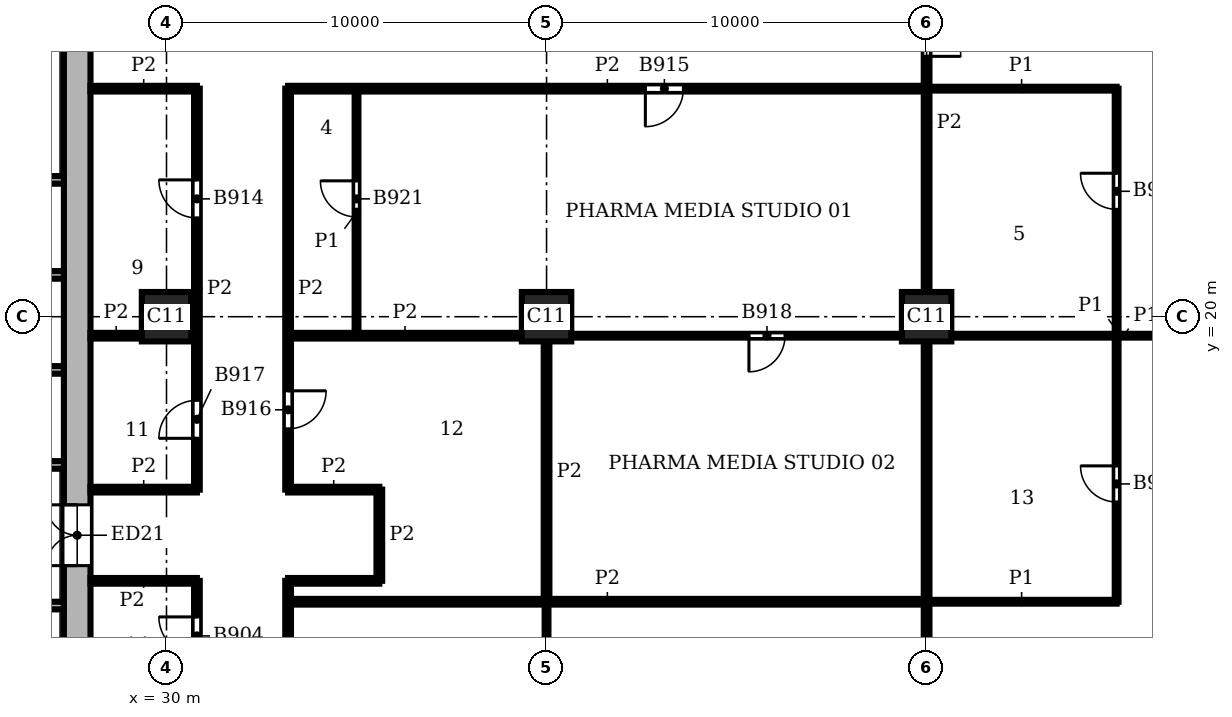
"""IFC4 building model, lengths in metres.
Left out: names, types, materials, properties, quantities, classifications, styles, units other than length and angle.
Written with IfcOpenShell. Run it as: python <this file> out.ifc"""

import sys

from ifc_helpers import new_model, si_unit, direction, frame, frame_2d, origin, origin_2d, place, context, subcontext, project, spatial, rectangle, extrude, element, fill, save


model = new_model("IFC4")
c1 = context("Model", 3, precision=1e-05, world=origin(), true_north=direction((0.0, 1.0)))
c2 = subcontext(c1, "Body", "Model", "MODEL_VIEW")
j1 = project(units=[si_unit("LENGTHUNIT", "METRE"), si_unit("PLANEANGLEUNIT", "RADIAN")], contexts=[c1])
p1 = place(None, origin())
s1 = spatial("IfcSite", under=j1, at=p1, CompositionType="ELEMENT")
p2 = place(p1, origin())
s2 = spatial("IfcBuilding", under=s1, at=p2, CompositionType="ELEMENT")
p3 = place(p2, frame((0.0, 0.0, 225.3)))
s3 = spatial("IfcBuildingStorey", under=s2, at=p3, CompositionType="ELEMENT", Elevation=225.3)
for number, where, z_axis, x_axis in (
    (1, (30.0, 20.0, 0.0), (0.0, 0.0, 1.0), (1.0, 0.0, 0.0)),
    (2, (40.0, 20.0, 0.0), (0.0, 0.0, 1.0), (1.0, 0.0, 0.0)),
    (3, (50.0, 20.0, 0.0), (0.0, 0.0, 1.0), (1.0, 0.0, 0.0)),
):
    element("IfcColumn", number, at=place(p3, frame(where, z_axis=z_axis, x_axis=x_axis)), inside=s3, PredefinedType="COLUMN", context=c2, shape_type="SweptSolid", body=[
        extrude(rectangle(XDim=1.3, YDim=1.3, at=origin_2d()), origin(), (0.0, 0.0, 1.0), 3.9),
    ])
p4 = place(p3, frame((27.65, 8.7, 0.0), z_axis=(0.0, 0.0, 1.0), x_axis=(0.0, 1.0, 0.0)))
e4 = element("IfcWall", 4, at=p4, inside=s3, PredefinedType="SHEAR", context=c2, shape_type="SweptSolid", body=[
    extrude(rectangle(XDim=18.6, YDim=0.7, at=frame_2d((9.3, 0.0))), origin(), (0.0, 0.0, 1.0), 3.9),
])
p5 = place(p4, frame((4.75, 0.0, 0.0)))
e5 = element("IfcOpeningElement", 5, at=p5, cuts=e4, PredefinedType="OPENING", context=c2, shape_type="SweptSolid", body=[
    extrude(rectangle(XDim=1.6, YDim=2.1, at=frame_2d((0.8, 1.05))), frame((0.0, 0.36, 0.0), z_axis=(0.0, -1.0, 0.0), x_axis=(1.0, 0.0, 0.0)), (0.0, 0.0, 1.0), 0.72),
])
p6 = place(p3, frame((13.8, 12.4, 0.0), z_axis=(0.0, 0.0, 1.0), x_axis=(1.0, 0.0, 0.0)))
e6 = element("IfcWall", 6, at=p6, inside=s3, PredefinedType="SHEAR", context=c2, shape_type="SweptSolid", body=[
    extrude(rectangle(XDim=13.5, YDim=0.2, at=frame_2d((6.75, 0.0))), origin(), (0.0, 0.0, 1.0), 3.58),
])
p7 = place(p6, frame((2.4, 0.0, 0.0)))
e7 = element("IfcOpeningElement", 7, at=p7, cuts=e6, PredefinedType="OPENING", context=c2, shape_type="SweptSolid", body=[
    extrude(rectangle(XDim=1.1, YDim=2.1, at=frame_2d((0.55, 1.05))), frame((0.0, 0.11, 0.0), z_axis=(0.0, -1.0, 0.0), x_axis=(1.0, 0.0, 0.0)), (0.0, 0.0, 1.0), 0.22),
])
p8 = place(p6, frame((4.9, 0.0, 0.0)))
e8 = element("IfcOpeningElement", 8, at=p8, cuts=e6, PredefinedType="OPENING", context=c2, shape_type="SweptSolid", body=[
    extrude(rectangle(XDim=1.1, YDim=2.1, at=frame_2d((0.55, 1.05))), frame((0.0, 0.11, 0.0), z_axis=(0.0, -1.0, 0.0), x_axis=(1.0, 0.0, 0.0)), (0.0, 0.0, 1.0), 0.22),
])
p9 = place(p6, frame((0.2, 0.0, 0.0)))
e9 = element("IfcOpeningElement", 9, at=p9, cuts=e6, PredefinedType="OPENING", context=c2, shape_type="SweptSolid", body=[
    extrude(rectangle(XDim=1.0, YDim=2.1, at=frame_2d((0.5, 1.05))), frame((0.0, 0.11, 0.0), z_axis=(0.0, -1.0, 0.0), x_axis=(1.0, 0.0, 0.0)), (0.0, 0.0, 1.0), 0.22),
])
for number, where, z_axis, x_axis in (
    (10, (24.3, 16.1, 0.0), (0.0, 0.0, 1.0), (1.0, 0.0, 0.0)),
    (11, (24.3, 18.6, 0.0), (0.0, 0.0, 1.0), (1.0, 0.0, 0.0)),
    (12, (24.3, 21.1, 0.0), (0.0, 0.0, 1.0), (1.0, 0.0, 0.0)),
):
    element("IfcWall", number, at=place(p3, frame(where, z_axis=z_axis, x_axis=x_axis)), inside=s3, PredefinedType="SHEAR", context=c2, shape_type="SweptSolid", body=[
        extrude(rectangle(XDim=3.0, YDim=0.2, at=frame_2d((1.5, 0.0))), origin(), (0.0, 0.0, 1.0), 3.58),
    ])
p10 = place(p3, frame((13.8, 23.6, 0.0), z_axis=(0.0, 0.0, 1.0), x_axis=(1.0, 0.0, 0.0)))
e13 = element("IfcWall", 13, at=p10, inside=s3, PredefinedType="SHEAR", context=c2, shape_type="SweptSolid", body=[
    extrude(rectangle(XDim=13.5, YDim=0.2, at=frame_2d((6.75, 0.0))), origin(), (0.0, 0.0, 1.0), 3.58),
])
p11 = place(p10, frame((2.4, 0.0, 0.0)))
e14 = element("IfcOpeningElement", 14, at=p11, cuts=e13, PredefinedType="OPENING", context=c2, shape_type="SweptSolid", body=[
    extrude(rectangle(XDim=1.1, YDim=2.1, at=frame_2d((0.55, 1.05))), frame((0.0, 0.11, 0.0), z_axis=(0.0, -1.0, 0.0), x_axis=(1.0, 0.0, 0.0)), (0.0, 0.0, 1.0), 0.22),
])
p12 = place(p10, frame((4.9, 0.0, 0.0)))
e15 = element("IfcOpeningElement", 15, at=p12, cuts=e13, PredefinedType="OPENING", context=c2, shape_type="SweptSolid", body=[
    extrude(rectangle(XDim=1.1, YDim=2.1, at=frame_2d((0.55, 1.05))), frame((0.0, 0.11, 0.0), z_axis=(0.0, -1.0, 0.0), x_axis=(1.0, 0.0, 0.0)), (0.0, 0.0, 1.0), 0.22),
])
p13 = place(p10, frame((0.2, 0.0, 0.0)))
e16 = element("IfcOpeningElement", 16, at=p13, cuts=e13, PredefinedType="OPENING", context=c2, shape_type="SweptSolid", body=[
    extrude(rectangle(XDim=1.0, YDim=2.1, at=frame_2d((0.5, 1.05))), frame((0.0, 0.11, 0.0), z_axis=(0.0, -1.0, 0.0), x_axis=(1.0, 0.0, 0.0)), (0.0, 0.0, 1.0), 0.22),
])
p14 = place(p3, frame((35.0, 19.5, 0.0), z_axis=(0.0, 0.0, 1.0), x_axis=(0.0, 1.0, 0.0)))
e17 = element("IfcWall", 17, at=p14, inside=s3, PredefinedType="PARTITIONING", context=c2, shape_type="SweptSolid", body=[
    extrude(rectangle(XDim=6.5, YDim=0.1, at=frame_2d((3.25, 0.0))), origin(), (0.0, 0.0, 1.0), 3.58),
])
p15 = place(p14, frame((3.125, 0.0, 0.0)))
e18 = element("IfcOpeningElement", 18, at=p15, cuts=e17, PredefinedType="OPENING", context=c2, shape_type="SweptSolid", body=[
    extrude(rectangle(XDim=0.95, YDim=2.1, at=frame_2d((0.475, 1.05))), frame((0.0, 0.06, 0.0), z_axis=(0.0, -1.0, 0.0), x_axis=(1.0, 0.0, 0.0)), (0.0, 0.0, 1.0), 0.12),
])
p16 = place(p3, frame((40.0, 10.65, 0.0), z_axis=(0.0, 0.0, 1.0), x_axis=(0.0, 1.0, 0.0)))
e19 = element("IfcWall", 19, at=p16, inside=s3, PredefinedType="PARTITIONING", context=c2, shape_type="SweptSolid", body=[
    extrude(rectangle(XDim=1.85, YDim=0.1, at=frame_2d((0.925, 0.0))), origin(), (0.0, 0.0, 1.0), 3.58),
])
p17 = place(p3, frame((55.0, 12.5, 0.0), z_axis=(0.0, 0.0, 1.0), x_axis=(0.0, 1.0, 0.0)))
e20 = element("IfcWall", 20, at=p17, inside=s3, PredefinedType="PARTITIONING", context=c2, shape_type="SweptSolid", body=[
    extrude(rectangle(XDim=13.5, YDim=0.1, at=frame_2d((6.75, 0.0))), origin(), (0.0, 0.0, 1.0), 3.58),
])
p18 = place(p17, frame((10.325, 0.0, 0.0)))
e21 = element("IfcOpeningElement", 21, at=p18, cuts=e20, PredefinedType="OPENING", context=c2, shape_type="SweptSolid", body=[
    extrude(rectangle(XDim=0.95, YDim=2.1, at=frame_2d((0.475, 1.05))), frame((0.0, 0.06, 0.0), z_axis=(0.0, -1.0, 0.0), x_axis=(1.0, 0.0, 0.0)), (0.0, 0.0, 1.0), 0.12),
])
p19 = place(p17, frame((2.625, 0.0, 0.0)))
e22 = element("IfcOpeningElement", 22, at=p19, cuts=e20, PredefinedType="OPENING", context=c2, shape_type="SweptSolid", body=[
    extrude(rectangle(XDim=0.95, YDim=2.1, at=frame_2d((0.475, 1.05))), frame((0.0, 0.06, 0.0), z_axis=(0.0, -1.0, 0.0), x_axis=(1.0, 0.0, 0.0)), (0.0, 0.0, 1.0), 0.12),
])
p20 = place(p3, frame((50.0, 12.5, 0.0), z_axis=(0.0, 0.0, 1.0), x_axis=(1.0, 0.0, 0.0)))
e23 = element("IfcWall", 23, at=p20, inside=s3, PredefinedType="PARTITIONING", context=c2, shape_type="SweptSolid", body=[
    extrude(rectangle(XDim=5.0, YDim=0.1, at=frame_2d((2.5, 0.0))), origin(), (0.0, 0.0, 1.0), 3.58),
])
p21 = place(p3, frame((40.65, 19.5, 0.0), z_axis=(0.0, 0.0, 1.0), x_axis=(1.0, 0.0, 0.0)))
e24 = element("IfcWall", 24, at=p21, inside=s3, PredefinedType="PARTITIONING", context=c2, shape_type="SweptSolid", body=[
    extrude(rectangle(XDim=8.7, YDim=0.1, at=frame_2d((4.35, 0.0))), origin(), (0.0, 0.0, 1.0), 3.58),
])
p22 = place(p21, frame((4.675, 0.0, 0.0)))
e25 = element("IfcOpeningElement", 25, at=p22, cuts=e24, PredefinedType="OPENING", context=c2, shape_type="SweptSolid", body=[
    extrude(rectangle(XDim=0.95, YDim=2.1, at=frame_2d((0.475, 1.05))), frame((0.0, 0.06, 0.0), z_axis=(0.0, -1.0, 0.0), x_axis=(1.0, 0.0, 0.0)), (0.0, 0.0, 1.0), 0.12),
])
p23 = place(p3, frame((50.65, 19.5, 0.0), z_axis=(0.0, 0.0, 1.0), x_axis=(1.0, 0.0, 0.0)))
e26 = element("IfcWall", 26, at=p23, inside=s3, PredefinedType="PARTITIONING", context=c2, shape_type="SweptSolid", body=[
    extrude(rectangle(XDim=8.9, YDim=0.1, at=frame_2d((4.45, 0.0))), origin(), (0.0, 0.0, 1.0), 3.58),
])
p24 = place(p23, frame((6.45, 0.0, 0.0)))
e27 = element("IfcOpeningElement", 27, at=p24, cuts=e26, PredefinedType="OPENING", context=c2, shape_type="SweptSolid", body=[
    extrude(rectangle(XDim=0.9, YDim=2.1, at=frame_2d((0.45, 1.05))), frame((0.0, 0.06, 0.0), z_axis=(0.0, -1.0, 0.0), x_axis=(1.0, 0.0, 0.0)), (0.0, 0.0, 1.0), 0.12),
])
p25 = place(p3, frame((50.0, 26.0, 0.0), z_axis=(0.0, 0.0, 1.0), x_axis=(1.0, 0.0, 0.0)))
e28 = element("IfcWall", 28, at=p25, inside=s3, PredefinedType="PARTITIONING", context=c2, shape_type="SweptSolid", body=[
    extrude(rectangle(XDim=5.0, YDim=0.1, at=frame_2d((2.5, 0.0))), origin(), (0.0, 0.0, 1.0), 3.58),
])
p26 = place(p3, frame((30.8, 8.001, 0.0), z_axis=(0.0, 0.0, 1.0), x_axis=(0.0, 1.0, 0.0)))
e29 = element("IfcWall", 29, at=p26, inside=s3, PredefinedType="PARTITIONING", context=c2, shape_type="SweptSolid", body=[
    extrude(rectangle(XDim=5.048, YDim=0.15, at=frame_2d((2.524, 0.0))), origin(), (0.0, 0.0, 1.0), 3.58),
])
p27 = place(p26, frame((3.1, 0.0, 0.0)))
e30 = element("IfcOpeningElement", 30, at=p27, cuts=e29, PredefinedType="OPENING", context=c2, shape_type="SweptSolid", body=[
    extrude(rectangle(XDim=1.0, YDim=2.1, at=frame_2d((0.5, 1.05))), frame((0.0, 0.085, 0.0), z_axis=(0.0, -1.0, 0.0), x_axis=(1.0, 0.0, 0.0)), (0.0, 0.0, 1.0), 0.17),
])
p28 = place(p3, frame((30.8, 15.45, 0.0), z_axis=(0.0, 0.0, 1.0), x_axis=(0.0, 1.0, 0.0)))
e31 = element("IfcWall", 31, at=p28, inside=s3, PredefinedType="PARTITIONING", context=c2, shape_type="SweptSolid", body=[
    extrude(rectangle(XDim=10.55, YDim=0.15, at=frame_2d((5.275, 0.0))), origin(), (0.0, 0.0, 1.0), 3.58),
])
p29 = place(p28, frame((7.15, 0.0, 0.0)))
e32 = element("IfcOpeningElement", 32, at=p29, cuts=e31, PredefinedType="OPENING", context=c2, shape_type="SweptSolid", body=[
    extrude(rectangle(XDim=1.0, YDim=2.1, at=frame_2d((0.5, 1.05))), frame((0.0, 0.085, 0.0), z_axis=(0.0, -1.0, 0.0), x_axis=(1.0, 0.0, 0.0)), (0.0, 0.0, 1.0), 0.17),
])
p30 = place(p28, frame((1.35, 0.0, 0.0)))
e33 = element("IfcOpeningElement", 33, at=p30, cuts=e31, PredefinedType="OPENING", context=c2, shape_type="SweptSolid", body=[
    extrude(rectangle(XDim=1.0, YDim=2.1, at=frame_2d((0.5, 1.05))), frame((0.0, 0.085, 0.0), z_axis=(0.0, -1.0, 0.0), x_axis=(1.0, 0.0, 0.0)), (0.0, 0.0, 1.0), 0.17),
])
p31 = place(p3, frame((33.2, 8.0, 0.0), z_axis=(0.0, 0.0, 1.0), x_axis=(0.0, 1.0, 0.0)))
e34 = element("IfcWall", 34, at=p31, inside=s3, PredefinedType="PARTITIONING", context=c2, shape_type="SweptSolid", body=[
    extrude(rectangle(XDim=5.05, YDim=0.15, at=frame_2d((2.525, 0.0))), origin(), (0.0, 0.0, 1.0), 3.58),
])
p32 = place(p3, frame((33.2, 15.45, 0.0), z_axis=(0.0, 0.0, 1.0), x_axis=(0.0, 1.0, 0.0)))
e35 = element("IfcWall", 35, at=p32, inside=s3, PredefinedType="PARTITIONING", context=c2, shape_type="SweptSolid", body=[
    extrude(rectangle(XDim=10.55, YDim=0.15, at=frame_2d((5.275, 0.0))), origin(), (0.0, 0.0, 1.0), 3.58),
])
p33 = place(p32, frame((1.6, 0.0, 0.0)))
e36 = element("IfcOpeningElement", 36, at=p33, cuts=e35, PredefinedType="OPENING", context=c2, shape_type="SweptSolid", body=[
    extrude(rectangle(XDim=1.0, YDim=2.1, at=frame_2d((0.5, 1.05))), frame((0.0, 0.085, 0.0), z_axis=(0.0, -1.0, 0.0), x_axis=(1.0, 0.0, 0.0)), (0.0, 0.0, 1.0), 0.17),
])
p34 = place(p3, frame((35.6, 13.05, 0.0), z_axis=(0.0, 0.0, 1.0), x_axis=(0.0, 1.0, 0.0)))
e37 = element("IfcWall", 37, at=p34, inside=s3, PredefinedType="PARTITIONING", context=c2, shape_type="SweptSolid", body=[
    extrude(rectangle(XDim=2.4, YDim=0.15, at=frame_2d((1.2, 0.0))), origin(), (0.0, 0.0, 1.0), 3.58),
])
p35 = place(p3, frame((40.0, 12.5, 0.0), z_axis=(0.0, 0.0, 1.0), x_axis=(0.0, 1.0, 0.0)))
e38 = element("IfcWall", 38, at=p35, inside=s3, PredefinedType="PARTITIONING", context=c2, shape_type="SweptSolid", body=[
    extrude(rectangle(XDim=6.85, YDim=0.15, at=frame_2d((3.425, 0.0))), origin(), (0.0, 0.0, 1.0), 3.58),
])
p36 = place(p3, frame((50.0, 10.65, 0.0), z_axis=(0.0, 0.0, 1.0), x_axis=(0.0, 1.0, 0.0)))
e39 = element("IfcWall", 39, at=p36, inside=s3, PredefinedType="PARTITIONING", context=c2, shape_type="SweptSolid", body=[
    extrude(rectangle(XDim=8.7, YDim=0.15, at=frame_2d((4.35, 0.0))), origin(), (0.0, 0.0, 1.0), 3.58),
])
p37 = place(p3, frame((50.0, 20.65, 0.0), z_axis=(0.0, 0.0, 1.0), x_axis=(0.0, 1.0, 0.0)))
e40 = element("IfcWall", 40, at=p37, inside=s3, PredefinedType="PARTITIONING", context=c2, shape_type="SweptSolid", body=[
    extrude(rectangle(XDim=8.9, YDim=0.15, at=frame_2d((4.45, 0.0))), origin(), (0.0, 0.0, 1.0), 3.58),
])
p38 = place(p37, frame((6.2, 0.0, 0.0)))
e41 = element("IfcOpeningElement", 41, at=p38, cuts=e40, PredefinedType="OPENING", context=c2, shape_type="SweptSolid", body=[
    extrude(rectangle(XDim=1.8, YDim=2.1, at=frame_2d((0.9, 1.05))), frame((0.0, 0.085, 0.0), z_axis=(0.0, -1.0, 0.0), x_axis=(1.0, 0.0, 0.0)), (0.0, 0.0, 1.0), 0.17),
])
p39 = place(p3, frame((33.2, 12.5, 0.0), z_axis=(0.0, 0.0, 1.0), x_axis=(1.0, 0.0, 0.0)))
e42 = element("IfcWall", 42, at=p39, inside=s3, PredefinedType="PARTITIONING", context=c2, shape_type="SweptSolid", body=[
    extrude(rectangle(XDim=16.8, YDim=0.15, at=frame_2d((8.4, 0.0))), origin(), (0.0, 0.0, 1.0), 3.58),
])
p40 = place(p3, frame((28.0, 13.05, 0.0), z_axis=(0.0, 0.0, 1.0), x_axis=(1.0, 0.0, 0.0)))
e43 = element("IfcWall", 43, at=p40, inside=s3, PredefinedType="PARTITIONING", context=c2, shape_type="SweptSolid", body=[
    extrude(rectangle(XDim=2.799, YDim=0.15, at=frame_2d((1.399, 0.0))), origin(), (0.0, 0.0, 1.0), 3.58),
])
p41 = place(p3, frame((33.2, 13.05, 0.0), z_axis=(0.0, 0.0, 1.0), x_axis=(1.0, 0.0, 0.0)))
e44 = element("IfcWall", 44, at=p41, inside=s3, PredefinedType="PARTITIONING", context=c2, shape_type="SweptSolid", body=[
    extrude(rectangle(XDim=2.4, YDim=0.15, at=frame_2d((1.2, 0.0))), origin(), (0.0, 0.0, 1.0), 3.58),
])
p42 = place(p3, frame((28.0, 15.45, 0.0), z_axis=(0.0, 0.0, 1.0), x_axis=(1.0, 0.0, 0.0)))
e45 = element("IfcWall", 45, at=p42, inside=s3, PredefinedType="PARTITIONING", context=c2, shape_type="SweptSolid", body=[
    extrude(rectangle(XDim=2.8, YDim=0.15, at=frame_2d((1.4, 0.0))), origin(), (0.0, 0.0, 1.0), 3.58),
])
p43 = place(p3, frame((33.2, 15.45, 0.0), z_axis=(0.0, 0.0, 1.0), x_axis=(1.0, 0.0, 0.0)))
e46 = element("IfcWall", 46, at=p43, inside=s3, PredefinedType="PARTITIONING", context=c2, shape_type="SweptSolid", body=[
    extrude(rectangle(XDim=2.4, YDim=0.15, at=frame_2d((1.2, 0.0))), origin(), (0.0, 0.0, 1.0), 3.58),
])
p44 = place(p3, frame((28.0, 19.5, 0.0), z_axis=(0.0, 0.0, 1.0), x_axis=(1.0, 0.0, 0.0)))
e47 = element("IfcWall", 47, at=p44, inside=s3, PredefinedType="PARTITIONING", context=c2, shape_type="SweptSolid", body=[
    extrude(rectangle(XDim=1.35, YDim=0.15, at=frame_2d((0.675, 0.0))), origin(), (0.0, 0.0, 1.0), 3.58),
])
p45 = place(p3, frame((33.2, 19.5, 0.0), z_axis=(0.0, 0.0, 1.0), x_axis=(1.0, 0.0, 0.0)))
e48 = element("IfcWall", 48, at=p45, inside=s3, PredefinedType="PARTITIONING", context=c2, shape_type="SweptSolid", body=[
    extrude(rectangle(XDim=6.15, YDim=0.15, at=frame_2d((3.075, 0.0))), origin(), (0.0, 0.0, 1.0), 3.58),
])
p46 = place(p3, frame((28.0, 26.0, 0.0), z_axis=(0.0, 0.0, 1.0), x_axis=(1.0, 0.0, 0.0)))
e49 = element("IfcWall", 49, at=p46, inside=s3, PredefinedType="PARTITIONING", context=c2, shape_type="SweptSolid", body=[
    extrude(rectangle(XDim=2.8, YDim=0.15, at=frame_2d((1.4, 0.0))), origin(), (0.0, 0.0, 1.0), 3.58),
])
p47 = place(p3, frame((33.2, 26.0, 0.0), z_axis=(0.0, 0.0, 1.0), x_axis=(1.0, 0.0, 0.0)))
e50 = element("IfcWall", 50, at=p47, inside=s3, PredefinedType="PARTITIONING", context=c2, shape_type="SweptSolid", body=[
    extrude(rectangle(XDim=16.8, YDim=0.15, at=frame_2d((8.4, 0.0))), origin(), (0.0, 0.0, 1.0), 3.58),
])
p48 = place(p47, frame((9.4, 0.0, 0.0)))
e51 = element("IfcOpeningElement", 51, at=p48, cuts=e50, PredefinedType="OPENING", context=c2, shape_type="SweptSolid", body=[
    extrude(rectangle(XDim=1.0, YDim=2.1, at=frame_2d((0.5, 1.05))), frame((0.0, 0.085, 0.0), z_axis=(0.0, -1.0, 0.0), x_axis=(1.0, 0.0, 0.0)), (0.0, 0.0, 1.0), 0.17),
])
p49 = place(p5, origin())
e52 = element("IfcDoor", 52, at=p49, inside=s3, OperationType="DOUBLE_DOOR_SINGLE_SWING", PredefinedType="DOOR", context=c2, shape_type="SweptSolid", body=[
    extrude(rectangle(XDim=1.6, YDim=2.1, at=frame_2d((0.8, 1.05))), frame((0.0, 0.025, 0.0), z_axis=(0.0, -1.0, 0.0), x_axis=(1.0, 0.0, 0.0)), (0.0, 0.0, 1.0), 0.05),
])
fill(e5, e52)
p50 = place(p27, origin())
e53 = element("IfcDoor", 53, at=p50, inside=s3, OperationType="SINGLE_SWING_RIGHT", PredefinedType="DOOR", context=c2, shape_type="SweptSolid", body=[
    extrude(rectangle(XDim=1.0, YDim=2.1, at=frame_2d((0.5, 1.05))), frame((0.0, 0.025, 0.0), z_axis=(0.0, -1.0, 0.0), x_axis=(1.0, 0.0, 0.0)), (0.0, 0.0, 1.0), 0.05),
])
fill(e30, e53)
p51 = place(p38, frame((1.8, 0.0, 0.0), z_axis=(0.0, 0.0, 1.0), x_axis=(-1.0, 0.0, 0.0)))
e54 = element("IfcDoor", 54, at=p51, inside=s3, OperationType="DOUBLE_DOOR_SINGLE_SWING", PredefinedType="DOOR", context=c2, shape_type="SweptSolid", body=[
    extrude(rectangle(XDim=1.8, YDim=2.1, at=frame_2d((0.9, 1.05))), frame((0.0, 0.025, 0.0), z_axis=(0.0, -1.0, 0.0), x_axis=(1.0, 0.0, 0.0)), (0.0, 0.0, 1.0), 0.05),
])
fill(e41, e54)
p52 = place(p29, origin())
e55 = element("IfcDoor", 55, at=p52, inside=s3, OperationType="SINGLE_SWING_RIGHT", PredefinedType="DOOR", context=c2, shape_type="SweptSolid", body=[
    extrude(rectangle(XDim=1.0, YDim=2.1, at=frame_2d((0.5, 1.05))), frame((0.0, 0.025, 0.0), z_axis=(0.0, -1.0, 0.0), x_axis=(1.0, 0.0, 0.0)), (0.0, 0.0, 1.0), 0.05),
])
fill(e32, e55)
p53 = place(p48, frame((1.0, 0.0, 0.0), z_axis=(0.0, 0.0, 1.0), x_axis=(-1.0, 0.0, 0.0)))
e56 = element("IfcDoor", 56, at=p53, inside=s3, OperationType="SINGLE_SWING_RIGHT", PredefinedType="DOOR", context=c2, shape_type="SweptSolid", body=[
    extrude(rectangle(XDim=1.0, YDim=2.1, at=frame_2d((0.5, 1.05))), frame((0.0, 0.025, 0.0), z_axis=(0.0, -1.0, 0.0), x_axis=(1.0, 0.0, 0.0)), (0.0, 0.0, 1.0), 0.05),
])
fill(e51, e56)
p54 = place(p33, frame((1.0, 0.0, 0.0), z_axis=(0.0, 0.0, 1.0), x_axis=(-1.0, 0.0, 0.0)))
e57 = element("IfcDoor", 57, at=p54, inside=s3, OperationType="SINGLE_SWING_LEFT", PredefinedType="DOOR", context=c2, shape_type="SweptSolid", body=[
    extrude(rectangle(XDim=1.0, YDim=2.1, at=frame_2d((0.5, 1.05))), frame((0.0, 0.025, 0.0), z_axis=(0.0, -1.0, 0.0), x_axis=(1.0, 0.0, 0.0)), (0.0, 0.0, 1.0), 0.05),
])
fill(e36, e57)
p55 = place(p30, origin())
e58 = element("IfcDoor", 58, at=p55, inside=s3, OperationType="SINGLE_SWING_LEFT", PredefinedType="DOOR", context=c2, shape_type="SweptSolid", body=[
    extrude(rectangle(XDim=1.0, YDim=2.1, at=frame_2d((0.5, 1.05))), frame((0.0, 0.025, 0.0), z_axis=(0.0, -1.0, 0.0), x_axis=(1.0, 0.0, 0.0)), (0.0, 0.0, 1.0), 0.05),
])
fill(e33, e58)
p56 = place(p22, frame((0.95, 0.0, 0.0), z_axis=(0.0, 0.0, 1.0), x_axis=(-1.0, 0.0, 0.0)))
e59 = element("IfcDoor", 59, at=p56, inside=s3, OperationType="SINGLE_SWING_RIGHT", PredefinedType="DOOR", context=c2, shape_type="SweptSolid", body=[
    extrude(rectangle(XDim=0.95, YDim=2.1, at=frame_2d((0.475, 1.05))), frame((0.0, 0.025, 0.0), z_axis=(0.0, -1.0, 0.0), x_axis=(1.0, 0.0, 0.0)), (0.0, 0.0, 1.0), 0.05),
])
fill(e25, e59)
p57 = place(p15, origin())
e60 = element("IfcDoor", 60, at=p57, inside=s3, OperationType="SINGLE_SWING_RIGHT", PredefinedType="DOOR", context=c2, shape_type="SweptSolid", body=[
    extrude(rectangle(XDim=0.95, YDim=2.1, at=frame_2d((0.475, 1.05))), frame((0.0, 0.025, 0.0), z_axis=(0.0, -1.0, 0.0), x_axis=(1.0, 0.0, 0.0)), (0.0, 0.0, 1.0), 0.05),
])
fill(e18, e60)
p58 = place(p18, origin())
e61 = element("IfcDoor", 61, at=p58, inside=s3, OperationType="SINGLE_SWING_RIGHT", PredefinedType="DOOR", context=c2, shape_type="SweptSolid", body=[
    extrude(rectangle(XDim=0.95, YDim=2.1, at=frame_2d((0.475, 1.05))), frame((0.0, 0.025, 0.0), z_axis=(0.0, -1.0, 0.0), x_axis=(1.0, 0.0, 0.0)), (0.0, 0.0, 1.0), 0.05),
])
fill(e21, e61)
p59 = place(p19, origin())
e62 = element("IfcDoor", 62, at=p59, inside=s3, OperationType="SINGLE_SWING_RIGHT", PredefinedType="DOOR", context=c2, shape_type="SweptSolid", body=[
    extrude(rectangle(XDim=0.95, YDim=2.1, at=frame_2d((0.475, 1.05))), frame((0.0, 0.025, 0.0), z_axis=(0.0, -1.0, 0.0), x_axis=(1.0, 0.0, 0.0)), (0.0, 0.0, 1.0), 0.05),
])
fill(e22, e62)
save(model, sys.argv[1])
